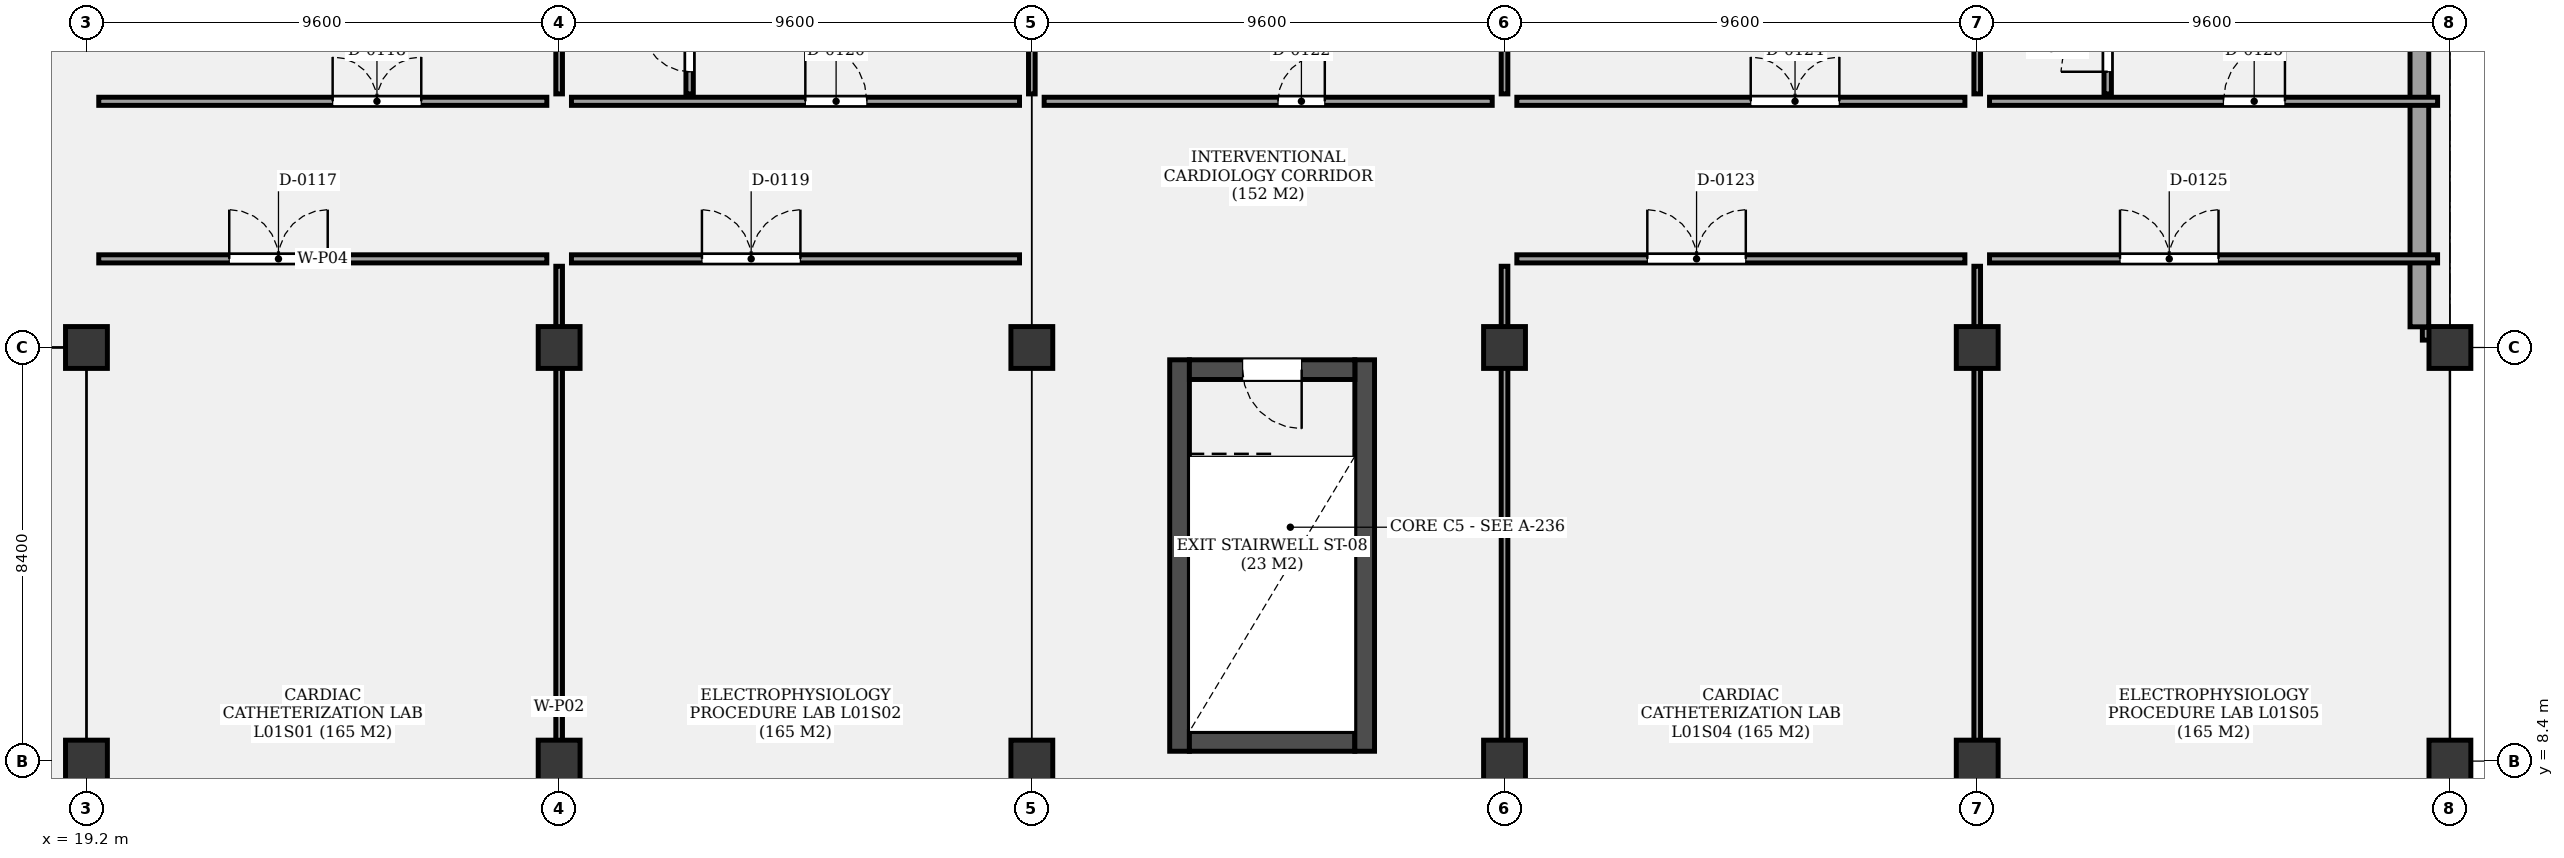
"""IFC4 building model, lengths in metres.
Left out: names, types, materials, properties, quantities, classifications, styles, units other than length and angle.
Written with IfcOpenShell. Run it as: python <this file> out.ifc"""

import sys

from ifc_helpers import new_model, si_unit, direction, frame, frame_2d, origin, origin_2d, place, context, subcontext, project, spatial, rectangle, extrude, element, fill, save


model = new_model("IFC4")
c1 = context("Model", 3, precision=1e-05, world=origin(), true_north=direction((0.0, 1.0)))
c2 = subcontext(c1, "Body", "Model", "MODEL_VIEW")
j1 = project(units=[si_unit("LENGTHUNIT", "METRE"), si_unit("PLANEANGLEUNIT", "RADIAN")], contexts=[c1])
p1 = place(None, origin())
s1 = spatial("IfcSite", under=j1, at=p1, CompositionType="ELEMENT")
p2 = place(p1, origin())
s2 = spatial("IfcBuilding", under=s1, at=p2, CompositionType="ELEMENT")
p3 = place(p2, frame((0.0, 0.0, 5.1)))
s3 = spatial("IfcBuildingStorey", under=s2, at=p3, CompositionType="ELEMENT", Elevation=5.1)
for number, where, z_axis, x_axis in (
    (1, (19.2, 8.4, 0.0), (0.0, 0.0, 1.0), (1.0, 0.0, 0.0)),
    (2, (19.2, 16.8, 0.0), (0.0, 0.0, 1.0), (1.0, 0.0, 0.0)),
    (3, (28.8, 8.4, 0.0), (0.0, 0.0, 1.0), (1.0, 0.0, 0.0)),
    (4, (28.8, 16.8, 0.0), (0.0, 0.0, 1.0), (1.0, 0.0, 0.0)),
    (5, (38.4, 8.4, 0.0), (0.0, 0.0, 1.0), (1.0, 0.0, 0.0)),
    (6, (38.4, 16.8, 0.0), (0.0, 0.0, 1.0), (1.0, 0.0, 0.0)),
    (7, (48.0, 8.4, 0.0), (0.0, 0.0, 1.0), (1.0, 0.0, 0.0)),
    (8, (48.0, 16.8, 0.0), (0.0, 0.0, 1.0), (1.0, 0.0, 0.0)),
    (9, (57.6, 8.4, 0.0), (0.0, 0.0, 1.0), (1.0, 0.0, 0.0)),
    (10, (57.6, 16.8, 0.0), (0.0, 0.0, 1.0), (1.0, 0.0, 0.0)),
    (11, (67.2, 8.4, 0.0), (0.0, 0.0, 1.0), (1.0, 0.0, 0.0)),
    (12, (67.2, 16.8, 0.0), (0.0, 0.0, 1.0), (1.0, 0.0, 0.0)),
):
    element("IfcColumn", number, at=place(p3, frame(where, z_axis=z_axis, x_axis=x_axis)), inside=s3, PredefinedType="COLUMN", context=c2, shape_type="SweptSolid", body=[
        extrude(rectangle(XDim=0.85, YDim=0.85, at=origin_2d()), origin(), (0.0, 0.0, 1.0), 4.8),
    ])
p4 = place(p3, frame((41.4, 16.55, 0.0), z_axis=(0.0, 0.0, 1.0), x_axis=(0.0, -1.0, 0.0)))
e13 = element("IfcWall", 13, at=p4, inside=s3, PredefinedType="SHEAR", context=c2, shape_type="SweptSolid", body=[
    extrude(rectangle(XDim=7.95, YDim=0.4, at=frame_2d((3.975, 0.0))), origin(), (0.0, 0.0, 1.0), 4.8),
])
p5 = place(p3, frame((41.6, 8.8, 0.0), z_axis=(0.0, 0.0, 1.0), x_axis=(1.0, 0.0, 0.0)))
e14 = element("IfcWall", 14, at=p5, inside=s3, PredefinedType="SHEAR", context=c2, shape_type="SweptSolid", body=[
    extrude(rectangle(XDim=3.36, YDim=0.4, at=frame_2d((1.68, 0.0))), origin(), (0.0, 0.0, 1.0), 4.8),
])
p6 = place(p3, frame((45.16, 8.6, 0.0), z_axis=(0.0, 0.0, 1.0), x_axis=(0.0, 1.0, 0.0)))
e15 = element("IfcWall", 15, at=p6, inside=s3, PredefinedType="SHEAR", context=c2, shape_type="SweptSolid", body=[
    extrude(rectangle(XDim=7.95, YDim=0.4, at=frame_2d((3.975, 0.0))), origin(), (0.0, 0.0, 1.0), 4.8),
])
p7 = place(p3, frame((44.96, 16.35, 0.0), z_axis=(0.0, 0.0, 1.0), x_axis=(-1.0, 0.0, 0.0)))
e16 = element("IfcWall", 16, at=p7, inside=s3, PredefinedType="SHEAR", context=c2, shape_type="SweptSolid", body=[
    extrude(rectangle(XDim=3.36, YDim=0.4, at=frame_2d((1.68, 0.0))), origin(), (0.0, 0.0, 1.0), 4.8),
])
p8 = place(p7, frame((1.08, 0.0, 0.0)))
e17 = element("IfcOpeningElement", 17, at=p8, cuts=e16, PredefinedType="OPENING", context=c2, shape_type="SweptSolid", body=[
    extrude(rectangle(XDim=1.2, YDim=2.2, at=frame_2d((0.6, 1.1))), frame((0.0, 0.21, 0.0), z_axis=(0.0, -1.0, 0.0), x_axis=(1.0, 0.0, 0.0)), (0.0, 0.0, 1.0), 0.42),
])
p9 = place(p3, frame((67.0, 17.08, 0.0), z_axis=(0.0, 0.0, 1.0), x_axis=(-1.0, 0.0, 0.0)))
e18 = element("IfcWall", 18, at=p9, inside=s3, PredefinedType="SOLIDWALL", context=c2, shape_type="SweptSolid", body=[
    extrude(rectangle(XDim=0.36, YDim=0.26, at=frame_2d((0.18, 0.0))), origin(), (0.0, 0.0, 1.0), 3.94),
])
p10 = place(p3, frame((66.58, 24.62, 0.0), z_axis=(0.0, 0.0, 1.0), x_axis=(0.0, -1.0, 0.0)))
e19 = element("IfcWall", 19, at=p10, inside=s3, PredefinedType="SOLIDWALL", context=c2, shape_type="SweptSolid", body=[
    extrude(rectangle(XDim=7.4, YDim=0.38, at=frame_2d((3.7, 0.0))), origin(), (0.0, 0.0, 1.0), 3.94),
])
p11 = place(p3, frame((19.45, 18.6, 0.0), z_axis=(0.0, 0.0, 1.0), x_axis=(1.0, 0.0, 0.0)))
e20 = element("IfcWall", 20, at=p11, inside=s3, PredefinedType="PARTITIONING", context=c2, shape_type="SweptSolid", body=[
    extrude(rectangle(XDim=9.1, YDim=0.165, at=frame_2d((4.55, 0.0))), origin(), (0.0, 0.0, 1.0), 3.68),
])
p12 = place(p11, frame((2.65, 0.0, 0.0)))
e21 = element("IfcOpeningElement", 21, at=p12, cuts=e20, PredefinedType="OPENING", context=c2, shape_type="SweptSolid", body=[
    extrude(rectangle(XDim=2.0, YDim=2.4, at=frame_2d((1.0, 1.2))), frame((0.0, 0.093, 0.0), z_axis=(0.0, -1.0, 0.0), x_axis=(1.0, 0.0, 0.0)), (0.0, 0.0, 1.0), 0.185),
])
p13 = place(p3, frame((19.45, 21.8, 0.0), z_axis=(0.0, 0.0, 1.0), x_axis=(1.0, 0.0, 0.0)))
e22 = element("IfcWall", 22, at=p13, inside=s3, PredefinedType="PARTITIONING", context=c2, shape_type="SweptSolid", body=[
    extrude(rectangle(XDim=9.1, YDim=0.165, at=frame_2d((4.55, 0.0))), origin(), (0.0, 0.0, 1.0), 3.68),
])
p14 = place(p13, frame((4.75, 0.0, 0.0)))
e23 = element("IfcOpeningElement", 23, at=p14, cuts=e22, PredefinedType="OPENING", context=c2, shape_type="SweptSolid", body=[
    extrude(rectangle(XDim=1.8, YDim=2.4, at=frame_2d((0.9, 1.2))), frame((0.0, 0.093, 0.0), z_axis=(0.0, -1.0, 0.0), x_axis=(1.0, 0.0, 0.0)), (0.0, 0.0, 1.0), 0.185),
])
p15 = place(p3, frame((29.05, 18.6, 0.0), z_axis=(0.0, 0.0, 1.0), x_axis=(1.0, 0.0, 0.0)))
e24 = element("IfcWall", 24, at=p15, inside=s3, PredefinedType="PARTITIONING", context=c2, shape_type="SweptSolid", body=[
    extrude(rectangle(XDim=9.1, YDim=0.165, at=frame_2d((4.55, 0.0))), origin(), (0.0, 0.0, 1.0), 3.68),
])
p16 = place(p15, frame((2.65, 0.0, 0.0)))
e25 = element("IfcOpeningElement", 25, at=p16, cuts=e24, PredefinedType="OPENING", context=c2, shape_type="SweptSolid", body=[
    extrude(rectangle(XDim=2.0, YDim=2.4, at=frame_2d((1.0, 1.2))), frame((0.0, 0.093, 0.0), z_axis=(0.0, -1.0, 0.0), x_axis=(1.0, 0.0, 0.0)), (0.0, 0.0, 1.0), 0.185),
])
p17 = place(p3, frame((28.8, 0.55, 0.0), z_axis=(0.0, 0.0, 1.0), x_axis=(0.0, 1.0, 0.0)))
e26 = element("IfcWall", 26, at=p17, inside=s3, PredefinedType="PARTITIONING", context=c2, shape_type="SweptSolid", body=[
    extrude(rectangle(XDim=17.9, YDim=0.135, at=frame_2d((8.95, 0.0))), origin(), (0.0, 0.0, 1.0), 3.68),
])
p18 = place(p3, frame((29.05, 21.8, 0.0), z_axis=(0.0, 0.0, 1.0), x_axis=(1.0, 0.0, 0.0)))
e27 = element("IfcWall", 27, at=p18, inside=s3, PredefinedType="PARTITIONING", context=c2, shape_type="SweptSolid", body=[
    extrude(rectangle(XDim=9.1, YDim=0.165, at=frame_2d((4.55, 0.0))), origin(), (0.0, 0.0, 1.0), 3.68),
])
p19 = place(p18, frame((4.75, 0.0, 0.0)))
e28 = element("IfcOpeningElement", 28, at=p19, cuts=e27, PredefinedType="OPENING", context=c2, shape_type="SweptSolid", body=[
    extrude(rectangle(XDim=1.25, YDim=2.2, at=frame_2d((0.625, 1.1))), frame((0.0, 0.093, 0.0), z_axis=(0.0, -1.0, 0.0), x_axis=(1.0, 0.0, 0.0)), (0.0, 0.0, 1.0), 0.185),
])
p20 = place(p3, frame((31.45, 21.95, 0.0), z_axis=(0.0, 0.0, 1.0), x_axis=(0.0, 1.0, 0.0)))
e29 = element("IfcWall", 29, at=p20, inside=s3, PredefinedType="PARTITIONING", context=c2, shape_type="SweptSolid", body=[
    extrude(rectangle(XDim=2.3, YDim=0.15, at=frame_2d((1.15, 0.0))), origin(), (0.0, 0.0, 1.0), 3.68),
])
p21 = place(p20, frame((0.45, 0.0, 0.0)))
e30 = element("IfcOpeningElement", 30, at=p21, cuts=e29, PredefinedType="OPENING", context=c2, shape_type="SweptSolid", body=[
    extrude(rectangle(XDim=0.95, YDim=2.1, at=frame_2d((0.475, 1.05))), frame((0.0, 0.085, 0.0), z_axis=(0.0, -1.0, 0.0), x_axis=(1.0, 0.0, 0.0)), (0.0, 0.0, 1.0), 0.17),
])
p22 = place(p3, frame((28.8, 21.95, 0.0), z_axis=(0.0, 0.0, 1.0), x_axis=(0.0, 1.0, 0.0)))
e31 = element("IfcWall", 31, at=p22, inside=s3, PredefinedType="PARTITIONING", context=c2, shape_type="SweptSolid", body=[
    extrude(rectangle(XDim=11.1, YDim=0.135, at=frame_2d((5.55, 0.0))), origin(), (0.0, 0.0, 1.0), 3.68),
])
p23 = place(p3, frame((38.65, 21.8, 0.0), z_axis=(0.0, 0.0, 1.0), x_axis=(1.0, 0.0, 0.0)))
e32 = element("IfcWall", 32, at=p23, inside=s3, PredefinedType="PARTITIONING", context=c2, shape_type="SweptSolid", body=[
    extrude(rectangle(XDim=9.1, YDim=0.165, at=frame_2d((4.55, 0.0))), origin(), (0.0, 0.0, 1.0), 3.68),
])
p24 = place(p23, frame((4.75, 0.0, 0.0)))
e33 = element("IfcOpeningElement", 33, at=p24, cuts=e32, PredefinedType="OPENING", context=c2, shape_type="SweptSolid", body=[
    extrude(rectangle(XDim=0.95, YDim=2.1, at=frame_2d((0.475, 1.05))), frame((0.0, 0.093, 0.0), z_axis=(0.0, -1.0, 0.0), x_axis=(1.0, 0.0, 0.0)), (0.0, 0.0, 1.0), 0.185),
])
p25 = place(p3, frame((38.4, 21.95, 0.0), z_axis=(0.0, 0.0, 1.0), x_axis=(0.0, 1.0, 0.0)))
e34 = element("IfcWall", 34, at=p25, inside=s3, PredefinedType="PARTITIONING", context=c2, shape_type="SweptSolid", body=[
    extrude(rectangle(XDim=11.1, YDim=0.135, at=frame_2d((5.55, 0.0))), origin(), (0.0, 0.0, 1.0), 3.68),
])
p26 = place(p3, frame((48.25, 18.6, 0.0), z_axis=(0.0, 0.0, 1.0), x_axis=(1.0, 0.0, 0.0)))
e35 = element("IfcWall", 35, at=p26, inside=s3, PredefinedType="PARTITIONING", context=c2, shape_type="SweptSolid", body=[
    extrude(rectangle(XDim=9.1, YDim=0.165, at=frame_2d((4.55, 0.0))), origin(), (0.0, 0.0, 1.0), 3.68),
])
p27 = place(p26, frame((2.65, 0.0, 0.0)))
e36 = element("IfcOpeningElement", 36, at=p27, cuts=e35, PredefinedType="OPENING", context=c2, shape_type="SweptSolid", body=[
    extrude(rectangle(XDim=2.0, YDim=2.4, at=frame_2d((1.0, 1.2))), frame((0.0, 0.093, 0.0), z_axis=(0.0, -1.0, 0.0), x_axis=(1.0, 0.0, 0.0)), (0.0, 0.0, 1.0), 0.185),
])
p28 = place(p3, frame((48.0, 0.55, 0.0), z_axis=(0.0, 0.0, 1.0), x_axis=(0.0, 1.0, 0.0)))
e37 = element("IfcWall", 37, at=p28, inside=s3, PredefinedType="PARTITIONING", context=c2, shape_type="SweptSolid", body=[
    extrude(rectangle(XDim=17.9, YDim=0.135, at=frame_2d((8.95, 0.0))), origin(), (0.0, 0.0, 1.0), 3.68),
])
p29 = place(p3, frame((48.25, 21.8, 0.0), z_axis=(0.0, 0.0, 1.0), x_axis=(1.0, 0.0, 0.0)))
e38 = element("IfcWall", 38, at=p29, inside=s3, PredefinedType="PARTITIONING", context=c2, shape_type="SweptSolid", body=[
    extrude(rectangle(XDim=9.1, YDim=0.165, at=frame_2d((4.55, 0.0))), origin(), (0.0, 0.0, 1.0), 3.68),
])
p30 = place(p29, frame((4.75, 0.0, 0.0)))
e39 = element("IfcOpeningElement", 39, at=p30, cuts=e38, PredefinedType="OPENING", context=c2, shape_type="SweptSolid", body=[
    extrude(rectangle(XDim=1.8, YDim=2.4, at=frame_2d((0.9, 1.2))), frame((0.0, 0.093, 0.0), z_axis=(0.0, -1.0, 0.0), x_axis=(1.0, 0.0, 0.0)), (0.0, 0.0, 1.0), 0.185),
])
p31 = place(p3, frame((48.0, 21.95, 0.0), z_axis=(0.0, 0.0, 1.0), x_axis=(0.0, 1.0, 0.0)))
e40 = element("IfcWall", 40, at=p31, inside=s3, PredefinedType="PARTITIONING", context=c2, shape_type="SweptSolid", body=[
    extrude(rectangle(XDim=11.1, YDim=0.135, at=frame_2d((5.55, 0.0))), origin(), (0.0, 0.0, 1.0), 3.68),
])
p32 = place(p3, frame((57.85, 18.6, 0.0), z_axis=(0.0, 0.0, 1.0), x_axis=(1.0, 0.0, 0.0)))
e41 = element("IfcWall", 41, at=p32, inside=s3, PredefinedType="PARTITIONING", context=c2, shape_type="SweptSolid", body=[
    extrude(rectangle(XDim=9.1, YDim=0.165, at=frame_2d((4.55, 0.0))), origin(), (0.0, 0.0, 1.0), 3.68),
])
p33 = place(p32, frame((2.65, 0.0, 0.0)))
e42 = element("IfcOpeningElement", 42, at=p33, cuts=e41, PredefinedType="OPENING", context=c2, shape_type="SweptSolid", body=[
    extrude(rectangle(XDim=2.0, YDim=2.4, at=frame_2d((1.0, 1.2))), frame((0.0, 0.093, 0.0), z_axis=(0.0, -1.0, 0.0), x_axis=(1.0, 0.0, 0.0)), (0.0, 0.0, 1.0), 0.185),
])
p34 = place(p3, frame((57.6, 0.55, 0.0), z_axis=(0.0, 0.0, 1.0), x_axis=(0.0, 1.0, 0.0)))
e43 = element("IfcWall", 43, at=p34, inside=s3, PredefinedType="PARTITIONING", context=c2, shape_type="SweptSolid", body=[
    extrude(rectangle(XDim=17.9, YDim=0.135, at=frame_2d((8.95, 0.0))), origin(), (0.0, 0.0, 1.0), 3.68),
])
p35 = place(p3, frame((57.85, 21.8, 0.0), z_axis=(0.0, 0.0, 1.0), x_axis=(1.0, 0.0, 0.0)))
e44 = element("IfcWall", 44, at=p35, inside=s3, PredefinedType="PARTITIONING", context=c2, shape_type="SweptSolid", body=[
    extrude(rectangle(XDim=9.1, YDim=0.165, at=frame_2d((4.55, 0.0))), origin(), (0.0, 0.0, 1.0), 3.68),
])
p36 = place(p35, frame((4.75, 0.0, 0.0)))
e45 = element("IfcOpeningElement", 45, at=p36, cuts=e44, PredefinedType="OPENING", context=c2, shape_type="SweptSolid", body=[
    extrude(rectangle(XDim=1.25, YDim=2.2, at=frame_2d((0.625, 1.1))), frame((0.0, 0.093, 0.0), z_axis=(0.0, -1.0, 0.0), x_axis=(1.0, 0.0, 0.0)), (0.0, 0.0, 1.0), 0.185),
])
p37 = place(p3, frame((60.25, 21.95, 0.0), z_axis=(0.0, 0.0, 1.0), x_axis=(0.0, 1.0, 0.0)))
e46 = element("IfcWall", 46, at=p37, inside=s3, PredefinedType="PARTITIONING", context=c2, shape_type="SweptSolid", body=[
    extrude(rectangle(XDim=2.3, YDim=0.15, at=frame_2d((1.15, 0.0))), origin(), (0.0, 0.0, 1.0), 3.68),
])
p38 = place(p37, frame((0.45, 0.0, 0.0)))
e47 = element("IfcOpeningElement", 47, at=p38, cuts=e46, PredefinedType="OPENING", context=c2, shape_type="SweptSolid", body=[
    extrude(rectangle(XDim=0.95, YDim=2.1, at=frame_2d((0.475, 1.05))), frame((0.0, 0.085, 0.0), z_axis=(0.0, -1.0, 0.0), x_axis=(1.0, 0.0, 0.0)), (0.0, 0.0, 1.0), 0.17),
])
p39 = place(p3, frame((57.6, 21.95, 0.0), z_axis=(0.0, 0.0, 1.0), x_axis=(0.0, 1.0, 0.0)))
e48 = element("IfcWall", 48, at=p39, inside=s3, PredefinedType="PARTITIONING", context=c2, shape_type="SweptSolid", body=[
    extrude(rectangle(XDim=11.1, YDim=0.135, at=frame_2d((5.55, 0.0))), origin(), (0.0, 0.0, 1.0), 3.68),
])
p40 = place(p8, origin())
e49 = element("IfcDoor", 49, at=p40, inside=s3, OperationType="SINGLE_SWING_LEFT", PredefinedType="DOOR", context=c2, shape_type="SweptSolid", body=[
    extrude(rectangle(XDim=1.2, YDim=2.2, at=frame_2d((0.6, 1.1))), frame((0.0, 0.025, 0.0), z_axis=(0.0, -1.0, 0.0), x_axis=(1.0, 0.0, 0.0)), (0.0, 0.0, 1.0), 0.05),
])
fill(e17, e49)
p41 = place(p12, origin())
e50 = element("IfcDoor", 50, at=p41, inside=s3, OperationType="DOUBLE_DOOR_SINGLE_SWING", PredefinedType="DOOR", context=c2, shape_type="SweptSolid", body=[
    extrude(rectangle(XDim=2.0, YDim=2.4, at=frame_2d((1.0, 1.2))), frame((0.0, 0.025, 0.0), z_axis=(0.0, -1.0, 0.0), x_axis=(1.0, 0.0, 0.0)), (0.0, 0.0, 1.0), 0.05),
])
fill(e21, e50)
p42 = place(p14, origin())
e51 = element("IfcDoor", 51, at=p42, inside=s3, OperationType="DOUBLE_DOOR_SINGLE_SWING", PredefinedType="DOOR", context=c2, shape_type="SweptSolid", body=[
    extrude(rectangle(XDim=1.8, YDim=2.4, at=frame_2d((0.9, 1.2))), frame((0.0, 0.025, 0.0), z_axis=(0.0, -1.0, 0.0), x_axis=(1.0, 0.0, 0.0)), (0.0, 0.0, 1.0), 0.05),
])
fill(e23, e51)
p43 = place(p16, origin())
e52 = element("IfcDoor", 52, at=p43, inside=s3, OperationType="DOUBLE_DOOR_SINGLE_SWING", PredefinedType="DOOR", context=c2, shape_type="SweptSolid", body=[
    extrude(rectangle(XDim=2.0, YDim=2.4, at=frame_2d((1.0, 1.2))), frame((0.0, 0.025, 0.0), z_axis=(0.0, -1.0, 0.0), x_axis=(1.0, 0.0, 0.0)), (0.0, 0.0, 1.0), 0.05),
])
fill(e25, e52)
p44 = place(p19, origin())
e53 = element("IfcDoor", 53, at=p44, inside=s3, OperationType="SINGLE_SWING_LEFT", PredefinedType="DOOR", context=c2, shape_type="SweptSolid", body=[
    extrude(rectangle(XDim=1.25, YDim=2.2, at=frame_2d((0.625, 1.1))), frame((0.0, 0.025, 0.0), z_axis=(0.0, -1.0, 0.0), x_axis=(1.0, 0.0, 0.0)), (0.0, 0.0, 1.0), 0.05),
])
fill(e28, e53)
p45 = place(p21, origin())
e54 = element("IfcDoor", 54, at=p45, inside=s3, OperationType="SINGLE_SWING_RIGHT", PredefinedType="DOOR", context=c2, shape_type="SweptSolid", body=[
    extrude(rectangle(XDim=0.95, YDim=2.1, at=frame_2d((0.475, 1.05))), frame((0.0, 0.025, 0.0), z_axis=(0.0, -1.0, 0.0), x_axis=(1.0, 0.0, 0.0)), (0.0, 0.0, 1.0), 0.05),
])
fill(e30, e54)
p46 = place(p24, origin())
e55 = element("IfcDoor", 55, at=p46, inside=s3, OperationType="SINGLE_SWING_RIGHT", PredefinedType="DOOR", context=c2, shape_type="SweptSolid", body=[
    extrude(rectangle(XDim=0.95, YDim=2.1, at=frame_2d((0.475, 1.05))), frame((0.0, 0.025, 0.0), z_axis=(0.0, -1.0, 0.0), x_axis=(1.0, 0.0, 0.0)), (0.0, 0.0, 1.0), 0.05),
])
fill(e33, e55)
p47 = place(p27, origin())
e56 = element("IfcDoor", 56, at=p47, inside=s3, OperationType="DOUBLE_DOOR_SINGLE_SWING", PredefinedType="DOOR", context=c2, shape_type="SweptSolid", body=[
    extrude(rectangle(XDim=2.0, YDim=2.4, at=frame_2d((1.0, 1.2))), frame((0.0, 0.025, 0.0), z_axis=(0.0, -1.0, 0.0), x_axis=(1.0, 0.0, 0.0)), (0.0, 0.0, 1.0), 0.05),
])
fill(e36, e56)
p48 = place(p30, origin())
e57 = element("IfcDoor", 57, at=p48, inside=s3, OperationType="DOUBLE_DOOR_SINGLE_SWING", PredefinedType="DOOR", context=c2, shape_type="SweptSolid", body=[
    extrude(rectangle(XDim=1.8, YDim=2.4, at=frame_2d((0.9, 1.2))), frame((0.0, 0.025, 0.0), z_axis=(0.0, -1.0, 0.0), x_axis=(1.0, 0.0, 0.0)), (0.0, 0.0, 1.0), 0.05),
])
fill(e39, e57)
p49 = place(p33, origin())
e58 = element("IfcDoor", 58, at=p49, inside=s3, OperationType="DOUBLE_DOOR_SINGLE_SWING", PredefinedType="DOOR", context=c2, shape_type="SweptSolid", body=[
    extrude(rectangle(XDim=2.0, YDim=2.4, at=frame_2d((1.0, 1.2))), frame((0.0, 0.025, 0.0), z_axis=(0.0, -1.0, 0.0), x_axis=(1.0, 0.0, 0.0)), (0.0, 0.0, 1.0), 0.05),
])
fill(e42, e58)
p50 = place(p36, origin())
e59 = element("IfcDoor", 59, at=p50, inside=s3, OperationType="SINGLE_SWING_RIGHT", PredefinedType="DOOR", context=c2, shape_type="SweptSolid", body=[
    extrude(rectangle(XDim=1.25, YDim=2.2, at=frame_2d((0.625, 1.1))), frame((0.0, 0.025, 0.0), z_axis=(0.0, -1.0, 0.0), x_axis=(1.0, 0.0, 0.0)), (0.0, 0.0, 1.0), 0.05),
])
fill(e45, e59)
p51 = place(p38, origin())
e60 = element("IfcDoor", 60, at=p51, inside=s3, OperationType="SINGLE_SWING_LEFT", PredefinedType="DOOR", context=c2, shape_type="SweptSolid", body=[
    extrude(rectangle(XDim=0.95, YDim=2.1, at=frame_2d((0.475, 1.05))), frame((0.0, 0.025, 0.0), z_axis=(0.0, -1.0, 0.0), x_axis=(1.0, 0.0, 0.0)), (0.0, 0.0, 1.0), 0.05),
])
fill(e47, e60)
save(model, sys.argv[1])
